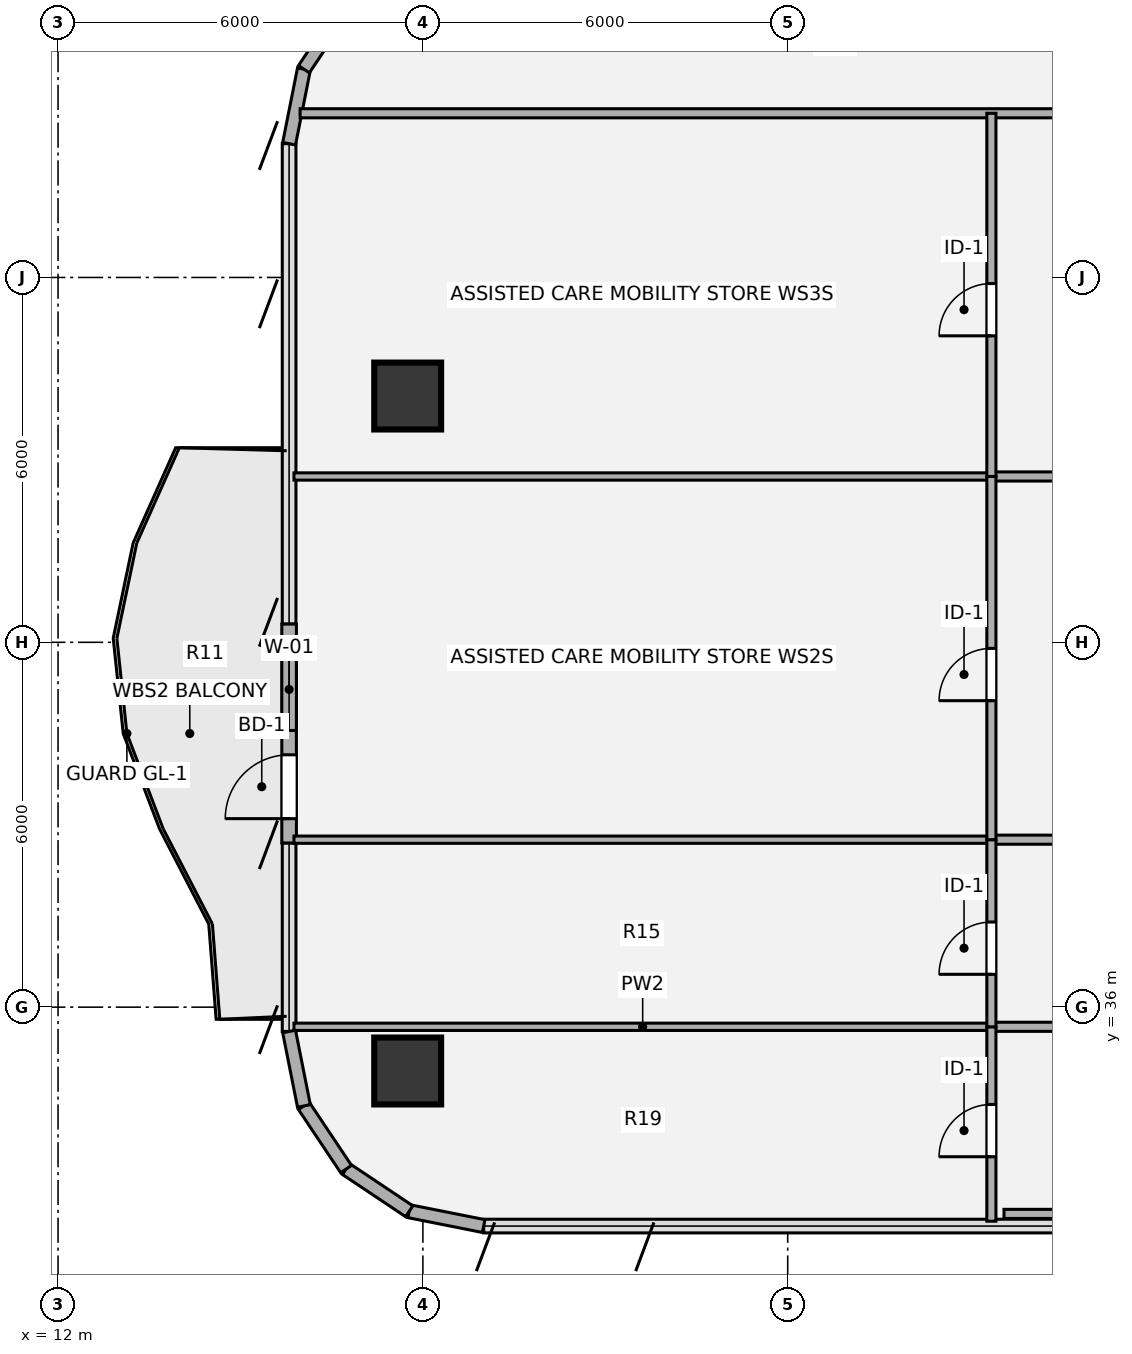
"""IFC4 building model, lengths in metres.
Left out: names, types, materials, properties, quantities, classifications, styles, units other than length and angle.
Written with IfcOpenShell. Run it as: python <this file> out.ifc"""

import sys

from ifc_helpers import new_model, si_unit, direction, frame, frame_2d, origin, origin_2d, place, context, subcontext, project, spatial, rectangle, hollow_circle, extrude, source, transform, mapped, element, fill, save


model = new_model("IFC4")
c1 = context("Model", 3, precision=1e-05, world=origin(), true_north=direction((0.0, 1.0)))
c2 = subcontext(c1, "Body", "Model", "MODEL_VIEW")
j1 = project(units=[si_unit("LENGTHUNIT", "METRE"), si_unit("PLANEANGLEUNIT", "RADIAN")], contexts=[c1])
p1 = place(None, origin())
s1 = spatial("IfcSite", under=j1, at=p1, CompositionType="ELEMENT")
p2 = place(p1, origin())
s2 = spatial("IfcBuilding", under=s1, at=p2, CompositionType="ELEMENT")
p3 = place(p2, frame((0.0, 0.0, 171.54)))
s3 = spatial("IfcBuildingStorey", under=s2, at=p3, CompositionType="ELEMENT", Elevation=171.54)
m1 = source(origin(), c2, "Body", "SweptSolid", [
    extrude(hollow_circle(Radius=0.55, WallThickness=0.04, at=origin_2d()), origin(), (0.0, 0.0, 1.0), 3.78),
])
for number, where, z_axis, x_axis in (
    (1, (17.75, 34.95, 0.0), (0.0, 0.0, 1.0), (1.0, 0.0, 0.0)),
    (2, (17.75, 46.05, 0.0), (0.0, 0.0, 1.0), (1.0, 0.0, 0.0)),
):
    element("IfcColumn", number, at=place(p3, frame(where, z_axis=z_axis, x_axis=x_axis)), inside=s3, PredefinedType="COLUMN", context=c2, shape_type="MappedRepresentation", body=[
        mapped(m1, transform((0.0, 0.0, 0.0), x_axis=(1.0, 0.0, 0.0), y_axis=(0.0, 1.0, 0.0), z_axis=(0.0, 0.0, 1.0), scale=1.0)),
    ])
for number, where, z_axis, x_axis in (
    (3, (19.0, 32.4, 0.0), (0.0, 0.0, 1.0), (-0.981, 0.195, 0.0)),
    (4, (17.775, 32.644, 0.0), (0.0, 0.0, 1.0), (-0.831, 0.556, 0.0)),
    (5, (16.737, 33.337, 0.0), (0.0, 0.0, 1.0), (-0.556, 0.831, 0.0)),
    (6, (16.044, 34.375, 0.0), (0.0, 0.0, 1.0), (-0.195, 0.981, 0.0)),
):
    element("IfcWall", number, at=place(p3, frame(where, z_axis=z_axis, x_axis=x_axis)), inside=s3, PredefinedType="SOLIDWALL", context=c2, shape_type="SweptSolid", body=[
        extrude(rectangle(XDim=1.249, YDim=0.215, at=frame_2d((0.624, 0.0))), origin(), (0.0, 0.0, 1.0), 3.53),
    ])
p4 = place(p3, frame((15.8, 38.7, 0.0), z_axis=(0.0, 0.0, 1.0), x_axis=(0.0, 1.0, 0.0)))
e7 = element("IfcWall", 7, at=p4, inside=s3, PredefinedType="SOLIDWALL", context=c2, shape_type="SweptSolid", body=[
    extrude(rectangle(XDim=3.6, YDim=0.24, at=frame_2d((1.8, 0.0))), origin(), (0.0, 0.0, 1.0), 3.53),
])
p5 = place(p4, frame((0.4, 0.0, 0.0)))
e8 = element("IfcOpeningElement", 8, at=p5, cuts=e7, PredefinedType="OPENING", context=c2, shape_type="SweptSolid", body=[
    extrude(rectangle(XDim=1.05, YDim=2.15, at=origin_2d()), frame((0.525, 0.13, 1.075), z_axis=(0.0, -1.0, 0.0), x_axis=(1.0, 0.0, 0.0)), (0.0, 0.0, 1.0), 0.26),
])
p6 = place(p4, frame((1.85, 0.0, 0.85)))
e9 = element("IfcOpeningElement", 9, at=p6, cuts=e7, PredefinedType="OPENING", context=c2, shape_type="SweptSolid", body=[
    extrude(rectangle(XDim=1.35, YDim=1.35, at=origin_2d()), frame((0.675, 0.13, 0.675), z_axis=(0.0, -1.0, 0.0), x_axis=(1.0, 0.0, 0.0)), (0.0, 0.0, 1.0), 0.26),
])
for number, where, z_axis, x_axis in (
    (10, (15.8, 50.2, 0.0), (0.0, 0.0, 1.0), (0.195, 0.981, 0.0)),
    (11, (16.044, 51.425, 0.0), (0.0, 0.0, 1.0), (0.556, 0.831, 0.0)),
):
    element("IfcWall", number, at=place(p3, frame(where, z_axis=z_axis, x_axis=x_axis)), inside=s3, PredefinedType="SOLIDWALL", context=c2, shape_type="SweptSolid", body=[
        extrude(rectangle(XDim=1.249, YDim=0.215, at=frame_2d((0.624, 0.0))), origin(), (0.0, 0.0, 1.0), 3.53),
    ])
p7 = place(p3, frame((27.557, 32.6, 0.0), z_axis=(0.0, 0.0, 1.0), x_axis=(1.0, 0.0, 0.0)))
e12 = element("IfcWall", 12, at=p7, inside=s3, PredefinedType="PARTITIONING", context=c2, shape_type="SweptSolid", body=[
    extrude(rectangle(XDim=5.993, YDim=0.15, at=frame_2d((2.997, 0.0))), origin(), (0.0, 0.0, 1.0), 3.5),
])
p8 = place(p3, frame((15.88, 35.677, 0.0), z_axis=(0.0, 0.0, 1.0), x_axis=(1.0, 0.0, 0.0)))
e13 = element("IfcWall", 13, at=p8, inside=s3, PredefinedType="PARTITIONING", context=c2, shape_type="SweptSolid", body=[
    extrude(rectangle(XDim=11.47, YDim=0.12, at=frame_2d((5.735, 0.0))), origin(), (0.0, 0.0, 1.0), 2.982),
])
p9 = place(p3, frame((27.35, 35.677, 0.0), z_axis=(0.0, 0.0, 1.0), x_axis=(1.0, 0.0, 0.0)))
e14 = element("IfcWall", 14, at=p9, inside=s3, PredefinedType="PARTITIONING", context=c2, shape_type="SweptSolid", body=[
    extrude(rectangle(XDim=6.2, YDim=0.15, at=frame_2d((3.1, 0.0))), origin(), (0.0, 0.0, 1.0), 2.982),
])
p10 = place(p3, frame((15.88, 38.754, 0.0), z_axis=(0.0, 0.0, 1.0), x_axis=(1.0, 0.0, 0.0)))
e15 = element("IfcWall", 15, at=p10, inside=s3, PredefinedType="PARTITIONING", context=c2, shape_type="SweptSolid", body=[
    extrude(rectangle(XDim=11.47, YDim=0.12, at=frame_2d((5.735, 0.0))), origin(), (0.0, 0.0, 1.0), 2.982),
])
p11 = place(p3, frame((27.35, 38.754, 0.0), z_axis=(0.0, 0.0, 1.0), x_axis=(1.0, 0.0, 0.0)))
e16 = element("IfcWall", 16, at=p11, inside=s3, PredefinedType="PARTITIONING", context=c2, shape_type="SweptSolid", body=[
    extrude(rectangle(XDim=6.2, YDim=0.15, at=frame_2d((3.1, 0.0))), origin(), (0.0, 0.0, 1.0), 2.982),
])
p12 = place(p3, frame((15.88, 44.727, 0.0), z_axis=(0.0, 0.0, 1.0), x_axis=(1.0, 0.0, 0.0)))
e17 = element("IfcWall", 17, at=p12, inside=s3, PredefinedType="PARTITIONING", context=c2, shape_type="SweptSolid", body=[
    extrude(rectangle(XDim=11.47, YDim=0.12, at=frame_2d((5.735, 0.0))), origin(), (0.0, 0.0, 1.0), 3.055),
])
p13 = place(p3, frame((27.35, 44.727, 0.0), z_axis=(0.0, 0.0, 1.0), x_axis=(1.0, 0.0, 0.0)))
e18 = element("IfcWall", 18, at=p13, inside=s3, PredefinedType="PARTITIONING", context=c2, shape_type="SweptSolid", body=[
    extrude(rectangle(XDim=6.2, YDim=0.15, at=frame_2d((3.1, 0.0))), origin(), (0.0, 0.0, 1.0), 3.055),
])
p14 = place(p3, frame((15.981, 50.7, 0.0), z_axis=(0.0, 0.0, 1.0), x_axis=(1.0, 0.0, 0.0)))
e19 = element("IfcWall", 19, at=p14, inside=s3, PredefinedType="PARTITIONING", context=c2, shape_type="SweptSolid", body=[
    extrude(rectangle(XDim=17.569, YDim=0.15, at=frame_2d((8.785, 0.0))), origin(), (0.0, 0.0, 1.0), 3.308),
])
p15 = place(p3, frame((27.35, 32.48, 0.0), z_axis=(0.0, 0.0, 1.0), x_axis=(0.0, 1.0, 0.0)))
e20 = element("IfcWall", 20, at=p15, inside=s3, PredefinedType="PARTITIONING", context=c2, shape_type="SweptSolid", body=[
    extrude(rectangle(XDim=3.197, YDim=0.15, at=frame_2d((1.599, 0.0))), origin(), (0.0, 0.0, 1.0), 3.5),
])
p16 = place(p15, frame((1.06, 0.0, 0.0)))
e21 = element("IfcOpeningElement", 21, at=p16, cuts=e20, PredefinedType="OPENING", context=c2, shape_type="SweptSolid", body=[
    extrude(rectangle(XDim=0.86, YDim=2.1, at=origin_2d()), frame((0.43, 0.085, 1.05), z_axis=(0.0, -1.0, 0.0), x_axis=(1.0, 0.0, 0.0)), (0.0, 0.0, 1.0), 0.17),
])
p17 = place(p3, frame((27.35, 35.677, 0.0), z_axis=(0.0, 0.0, 1.0), x_axis=(0.0, 1.0, 0.0)))
e22 = element("IfcWall", 22, at=p17, inside=s3, PredefinedType="PARTITIONING", context=c2, shape_type="SweptSolid", body=[
    extrude(rectangle(XDim=3.077, YDim=0.15, at=frame_2d((1.539, 0.0))), origin(), (0.0, 0.0, 1.0), 3.5),
])
p18 = place(p17, frame((0.863, 0.0, 0.0)))
e23 = element("IfcOpeningElement", 23, at=p18, cuts=e22, PredefinedType="OPENING", context=c2, shape_type="SweptSolid", body=[
    extrude(rectangle(XDim=0.86, YDim=2.1, at=origin_2d()), frame((0.43, 0.085, 1.05), z_axis=(0.0, -1.0, 0.0), x_axis=(1.0, 0.0, 0.0)), (0.0, 0.0, 1.0), 0.17),
])
p19 = place(p3, frame((27.35, 38.754, 0.0), z_axis=(0.0, 0.0, 1.0), x_axis=(0.0, 1.0, 0.0)))
e24 = element("IfcWall", 24, at=p19, inside=s3, PredefinedType="PARTITIONING", context=c2, shape_type="SweptSolid", body=[
    extrude(rectangle(XDim=5.973, YDim=0.15, at=frame_2d((2.987, 0.0))), origin(), (0.0, 0.0, 1.0), 3.5),
])
p20 = place(p19, frame((2.286, 0.0, 0.0)))
e25 = element("IfcOpeningElement", 25, at=p20, cuts=e24, PredefinedType="OPENING", context=c2, shape_type="SweptSolid", body=[
    extrude(rectangle(XDim=0.86, YDim=2.1, at=origin_2d()), frame((0.43, 0.085, 1.05), z_axis=(0.0, -1.0, 0.0), x_axis=(1.0, 0.0, 0.0)), (0.0, 0.0, 1.0), 0.17),
])
p21 = place(p3, frame((27.35, 44.727, 0.0), z_axis=(0.0, 0.0, 1.0), x_axis=(0.0, 1.0, 0.0)))
e26 = element("IfcWall", 26, at=p21, inside=s3, PredefinedType="PARTITIONING", context=c2, shape_type="SweptSolid", body=[
    extrude(rectangle(XDim=5.973, YDim=0.15, at=frame_2d((2.986, 0.0))), origin(), (0.0, 0.0, 1.0), 3.5),
])
p22 = place(p21, frame((2.313, 0.0, 0.0)))
e27 = element("IfcOpeningElement", 27, at=p22, cuts=e26, PredefinedType="OPENING", context=c2, shape_type="SweptSolid", body=[
    extrude(rectangle(XDim=0.86, YDim=2.1, at=origin_2d()), frame((0.43, 0.085, 1.05), z_axis=(0.0, -1.0, 0.0), x_axis=(1.0, 0.0, 0.0)), (0.0, 0.0, 1.0), 0.17),
])
m2 = source(origin(), c2, "Body", "SweptSolid", [
    extrude(rectangle(XDim=1.05, YDim=2.15, at=origin_2d()), frame((0.525, 0.025, 1.075), z_axis=(0.0, -1.0, 0.0), x_axis=(1.0, 0.0, 0.0)), (0.0, 0.0, 1.0), 0.05),
])
p23 = place(p5, origin())
e28 = element("IfcDoor", 28, at=p23, inside=s3, OperationType="SINGLE_SWING_LEFT", PredefinedType="DOOR", context=c2, shape_type="MappedRepresentation", body=[
    mapped(m2, transform((0.0, 0.0, 0.0), x_axis=(1.0, 0.0, 0.0), y_axis=(0.0, 1.0, 0.0), z_axis=(0.0, 0.0, 1.0), scale=1.0)),
])
fill(e8, e28)
m3 = source(origin(), c2, "Body", "SweptSolid", [
    extrude(rectangle(XDim=1.35, YDim=1.35, at=origin_2d()), frame((0.675, 0.03, 0.675), z_axis=(0.0, -1.0, 0.0), x_axis=(1.0, 0.0, 0.0)), (0.0, 0.0, 1.0), 0.06),
])
p24 = place(p6, origin())
e29 = element("IfcWindow", 29, at=p24, inside=s3, PartitioningType="SINGLE_PANEL", PredefinedType="WINDOW", context=c2, shape_type="MappedRepresentation", body=[
    mapped(m3, transform((0.0, 0.0, 0.0), x_axis=(1.0, 0.0, 0.0), y_axis=(0.0, 1.0, 0.0), z_axis=(0.0, 0.0, 1.0), scale=1.0)),
])
fill(e9, e29)
m4 = source(origin(), c2, "Body", "SweptSolid", [
    extrude(rectangle(XDim=0.86, YDim=2.1, at=origin_2d()), frame((0.43, 0.025, 1.05), z_axis=(0.0, -1.0, 0.0), x_axis=(1.0, 0.0, 0.0)), (0.0, 0.0, 1.0), 0.05),
])
p25 = place(p16, origin())
e30 = element("IfcDoor", 30, at=p25, inside=s3, OperationType="SINGLE_SWING_LEFT", PredefinedType="DOOR", context=c2, shape_type="MappedRepresentation", body=[
    mapped(m4, transform((0.0, 0.0, 0.0), x_axis=(1.0, 0.0, 0.0), y_axis=(0.0, 1.0, 0.0), z_axis=(0.0, 0.0, 1.0), scale=1.0)),
])
fill(e21, e30)
p26 = place(p18, origin())
e31 = element("IfcDoor", 31, at=p26, inside=s3, OperationType="SINGLE_SWING_LEFT", PredefinedType="DOOR", context=c2, shape_type="MappedRepresentation", body=[
    mapped(m4, transform((0.0, 0.0, 0.0), x_axis=(1.0, 0.0, 0.0), y_axis=(0.0, 1.0, 0.0), z_axis=(0.0, 0.0, 1.0), scale=1.0)),
])
fill(e23, e31)
p27 = place(p20, origin())
e32 = element("IfcDoor", 32, at=p27, inside=s3, OperationType="SINGLE_SWING_LEFT", PredefinedType="DOOR", context=c2, shape_type="MappedRepresentation", body=[
    mapped(m4, transform((0.0, 0.0, 0.0), x_axis=(1.0, 0.0, 0.0), y_axis=(0.0, 1.0, 0.0), z_axis=(0.0, 0.0, 1.0), scale=1.0)),
])
fill(e25, e32)
p28 = place(p22, origin())
e33 = element("IfcDoor", 33, at=p28, inside=s3, OperationType="SINGLE_SWING_LEFT", PredefinedType="DOOR", context=c2, shape_type="MappedRepresentation", body=[
    mapped(m4, transform((0.0, 0.0, 0.0), x_axis=(1.0, 0.0, 0.0), y_axis=(0.0, 1.0, 0.0), z_axis=(0.0, 0.0, 1.0), scale=1.0)),
])
fill(e27, e33)
save(model, sys.argv[1])
